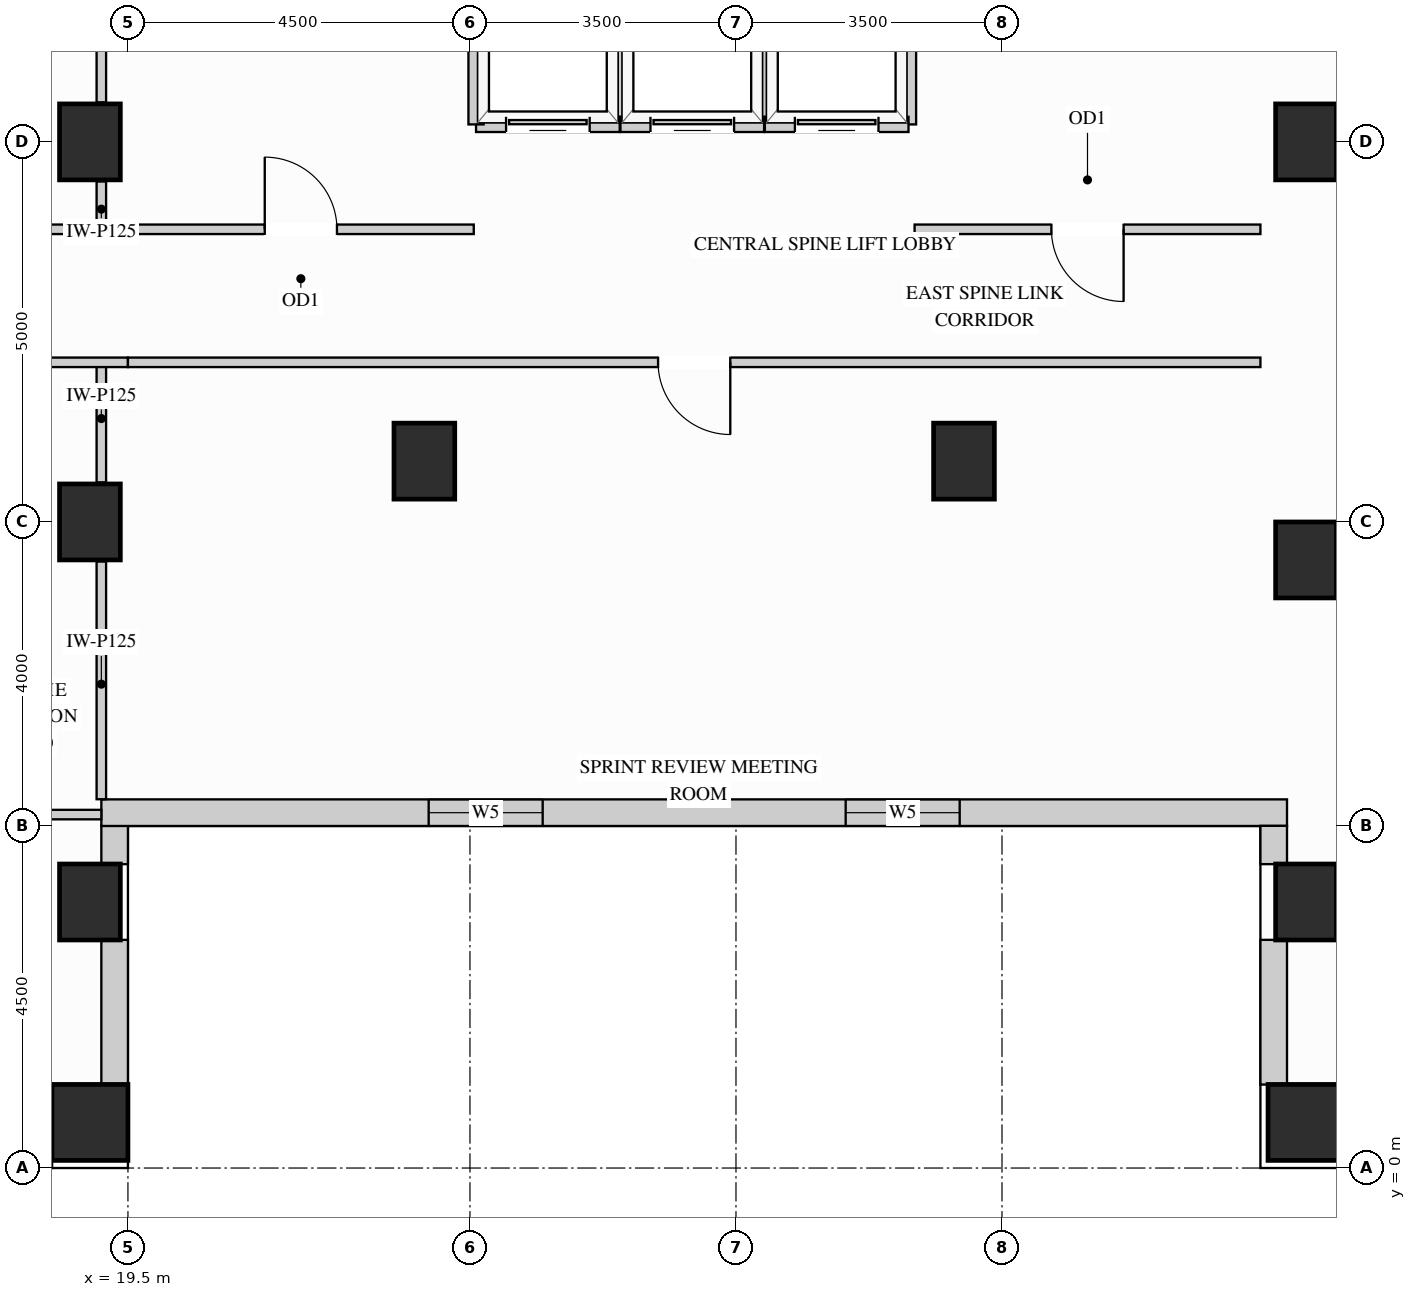
"""IFC4 building model, lengths in metres.
Left out: names, types, materials, properties, quantities, classifications, styles, units other than length and angle.
Written with IfcOpenShell. Run it as: python <this file> out.ifc"""

import sys

from ifc_helpers import new_model, si_unit, direction, frame, frame_2d, origin, origin_2d, place, context, subcontext, project, spatial, rectangle, extrude, source, transform, mapped, element, fill, save


model = new_model("IFC4")
c1 = context("Model", 3, precision=1e-05, world=origin(), true_north=direction((0.0, 1.0)))
c2 = subcontext(c1, "Body", "Model", "MODEL_VIEW")
j1 = project(units=[si_unit("LENGTHUNIT", "METRE"), si_unit("PLANEANGLEUNIT", "RADIAN")], contexts=[c1])
p1 = place(None, origin())
s1 = spatial("IfcSite", under=j1, at=p1, CompositionType="ELEMENT")
p2 = place(p1, origin())
s2 = spatial("IfcBuilding", under=s1, at=p2, CompositionType="ELEMENT")
p3 = place(p2, frame((0.0, 0.0, 143.1)))
s3 = spatial("IfcBuildingStorey", under=s2, at=p3, CompositionType="ELEMENT", Elevation=143.1)
m1 = source(origin(), c2, "Body", "SweptSolid", [
    extrude(rectangle(XDim=0.8, YDim=1.0, at=origin_2d()), origin(), (0.0, 0.0, 1.0), 3.4),
])
for number, where, z_axis, x_axis in (
    (1, (19.0, 13.5, 0.0), (0.0, 0.0, 1.0), (1.0, 0.0, 0.0)),
    (2, (19.0, 3.5, 0.0), (0.0, 0.0, 1.0), (1.0, 0.0, 0.0)),
    (3, (19.0, 8.5, 0.0), (0.0, 0.0, 1.0), (1.0, 0.0, 0.0)),
    (4, (35.0, 13.5, 0.0), (0.0, 0.0, 1.0), (1.0, 0.0, 0.0)),
    (5, (35.0, 3.5, 0.0), (0.0, 0.0, 1.0), (1.0, 0.0, 0.0)),
    (6, (35.0, 8.0, 0.0), (0.0, 0.0, 1.0), (1.0, 0.0, 0.0)),
    (7, (23.4, 9.3, 0.0), (0.0, 0.0, 1.0), (1.0, 0.0, 0.0)),
    (8, (30.5, 9.3, 0.0), (0.0, 0.0, 1.0), (1.0, 0.0, 0.0)),
):
    element("IfcColumn", number, at=place(p3, frame(where, z_axis=z_axis, x_axis=x_axis)), inside=s3, PredefinedType="COLUMN", context=c2, shape_type="MappedRepresentation", body=[
        mapped(m1, transform((0.0, 0.0, 0.0), x_axis=(1.0, 0.0, 0.0), y_axis=(0.0, 1.0, 0.0), z_axis=(0.0, 0.0, 1.0))),
    ])
m2 = source(origin(), c2, "Body", "SweptSolid", [
    extrude(rectangle(XDim=1.0, YDim=1.0, at=origin_2d()), origin(), (0.0, 0.0, 1.0), 3.4),
])
for number, where, z_axis, x_axis in (
    (9, (19.0, 0.6, 0.0), (0.0, 0.0, 1.0), (1.0, 0.0, 0.0)),
    (10, (35.0, 0.6, 0.0), (0.0, 0.0, 1.0), (1.0, 0.0, 0.0)),
):
    element("IfcColumn", number, at=place(p3, frame(where, z_axis=z_axis, x_axis=x_axis)), inside=s3, PredefinedType="COLUMN", context=c2, shape_type="MappedRepresentation", body=[
        mapped(m2, transform((0.0, 0.0, 0.0), x_axis=(1.0, 0.0, 0.0), y_axis=(0.0, 1.0, 0.0), z_axis=(0.0, 0.0, 1.0))),
    ])
p4 = place(p3, frame((14.998, 0.175, 0.0), z_axis=(0.0, 0.0, 1.0), x_axis=(1.0, 0.0, 0.0)))
e11 = element("IfcWall", 11, at=p4, inside=s3, PredefinedType="SOLIDWALL", context=c2, shape_type="SweptSolid", body=[
    extrude(rectangle(XDim=3.504, YDim=0.35, at=frame_2d((1.752, 0.0))), origin(), (0.0, 0.0, 1.0), 2.612),
])
p5 = place(p4, frame((0.552, 0.0, 0.78)))
e12 = element("IfcOpeningElement", 12, at=p5, cuts=e11, PredefinedType="OPENING", context=c2, shape_type="SweptSolid", body=[
    extrude(rectangle(XDim=2.4, YDim=1.652, at=frame_2d((1.2, 0.826))), frame((0.0, 0.185, 0.0), z_axis=(0.0, -1.0, 0.0), x_axis=(1.0, 0.0, 0.0)), (0.0, 0.0, 1.0), 0.37),
])
m3 = source(origin(), c2, "Body", "SweptSolid", [
    extrude(rectangle(XDim=1.904, YDim=0.35, at=frame_2d((0.952, 0.0))), origin(), (0.0, 0.0, 1.0), 2.612),
])
p6 = place(p3, frame((19.325, 1.098, 0.0), z_axis=(0.0, 0.0, 1.0), x_axis=(0.0, 1.0, 0.0)))
e13 = element("IfcWall", 13, at=p6, inside=s3, PredefinedType="SOLIDWALL", context=c2, shape_type="MappedRepresentation", body=[
    mapped(m3, transform((0.0, 0.0, 0.0), x_axis=(1.0, 0.0, 0.0), y_axis=(0.0, 1.0, 0.0), z_axis=(0.0, 0.0, 1.0))),
])
m4 = source(origin(), c2, "Body", "SweptSolid", [
    extrude(rectangle(XDim=0.504, YDim=0.35, at=frame_2d((0.252, 0.0))), origin(), (0.0, 0.0, 1.0), 2.773),
])
p7 = place(p3, frame((19.325, 3.998, 0.0), z_axis=(0.0, 0.0, 1.0), x_axis=(0.0, 1.0, 0.0)))
e14 = element("IfcWall", 14, at=p7, inside=s3, PredefinedType="SOLIDWALL", context=c2, shape_type="MappedRepresentation", body=[
    mapped(m4, transform((0.0, 0.0, 0.0), x_axis=(1.0, 0.0, 0.0), y_axis=(0.0, 1.0, 0.0), z_axis=(0.0, 0.0, 1.0))),
])
p8 = place(p3, frame((19.15, 4.675, 0.0), z_axis=(0.0, 0.0, 1.0), x_axis=(1.0, 0.0, 0.0)))
e15 = element("IfcWall", 15, at=p8, inside=s3, PredefinedType="SOLIDWALL", context=c2, shape_type="SweptSolid", body=[
    extrude(rectangle(XDim=15.6, YDim=0.35, at=frame_2d((7.8, 0.0))), origin(), (0.0, 0.0, 1.0), 3.385),
])
p9 = place(p8, frame((4.307, 0.0, 0.78)))
e16 = element("IfcOpeningElement", 16, at=p9, cuts=e15, PredefinedType="OPENING", context=c2, shape_type="SweptSolid", body=[
    extrude(rectangle(XDim=1.5, YDim=2.0, at=frame_2d((0.75, 1.0))), frame((0.0, 0.185, 0.0), z_axis=(0.0, -1.0, 0.0), x_axis=(1.0, 0.0, 0.0)), (0.0, 0.0, 1.0), 0.37),
])
p10 = place(p8, frame((9.793, 0.0, 0.78)))
e17 = element("IfcOpeningElement", 17, at=p10, cuts=e15, PredefinedType="OPENING", context=c2, shape_type="SweptSolid", body=[
    extrude(rectangle(XDim=1.5, YDim=2.0, at=frame_2d((0.75, 1.0))), frame((0.0, 0.185, 0.0), z_axis=(0.0, -1.0, 0.0), x_axis=(1.0, 0.0, 0.0)), (0.0, 0.0, 1.0), 0.37),
])
m5 = source(origin(), c2, "Body", "SweptSolid", [
    extrude(rectangle(XDim=0.504, YDim=0.35, at=frame_2d((0.252, 0.0))), origin(), (0.0, 0.0, 1.0), 3.385),
])
p11 = place(p3, frame((34.575, 4.502, 0.0), z_axis=(0.0, 0.0, 1.0), x_axis=(0.0, -1.0, 0.0)))
e18 = element("IfcWall", 18, at=p11, inside=s3, PredefinedType="SOLIDWALL", context=c2, shape_type="MappedRepresentation", body=[
    mapped(m5, transform((0.0, 0.0, 0.0), x_axis=(1.0, 0.0, 0.0), y_axis=(0.0, 1.0, 0.0), z_axis=(0.0, 0.0, 1.0))),
])
p12 = place(p3, frame((34.575, 3.002, 0.0), z_axis=(0.0, 0.0, 1.0), x_axis=(0.0, -1.0, 0.0)))
e19 = element("IfcWall", 19, at=p12, inside=s3, PredefinedType="SOLIDWALL", context=c2, shape_type="MappedRepresentation", body=[
    mapped(m3, transform((0.0, 0.0, 0.0), x_axis=(1.0, 0.0, 0.0), y_axis=(0.0, 1.0, 0.0), z_axis=(0.0, 0.0, 1.0))),
])
m6 = source(origin(), c2, "Body", "SweptSolid", [
    extrude(rectangle(XDim=0.63, YDim=0.125, at=frame_2d((0.315, 0.0))), origin(), (0.0, 0.0, 1.0), 2.773),
])
p13 = place(p3, frame((19.15, 12.35, 0.0), z_axis=(0.0, 0.0, 1.0), x_axis=(0.0, 1.0, 0.0)))
e20 = element("IfcWall", 20, at=p13, inside=s3, PredefinedType="PARTITIONING", context=c2, shape_type="MappedRepresentation", body=[
    mapped(m6, transform((0.0, 0.0, 0.0), x_axis=(1.0, 0.0, 0.0), y_axis=(0.0, 1.0, 0.0), z_axis=(0.0, 0.0, 1.0))),
])
m7 = source(origin(), c2, "Body", "SweptSolid", [
    extrude(rectangle(XDim=3.46, YDim=0.125, at=frame_2d((1.73, 0.0))), origin(), (0.0, 0.0, 1.0), 2.773),
])
p14 = place(p3, frame((19.15, 14.02, 0.0), z_axis=(0.0, 0.0, 1.0), x_axis=(0.0, 1.0, 0.0)))
e21 = element("IfcWall", 21, at=p14, inside=s3, PredefinedType="PARTITIONING", context=c2, shape_type="MappedRepresentation", body=[
    mapped(m7, transform((0.0, 0.0, 0.0), x_axis=(1.0, 0.0, 0.0), y_axis=(0.0, 1.0, 0.0), z_axis=(0.0, 0.0, 1.0))),
])
m8 = source(origin(), c2, "Body", "SweptSolid", [
    extrude(rectangle(XDim=3.128, YDim=0.125, at=frame_2d((1.564, 0.0))), origin(), (0.0, 0.0, 1.0), 2.773),
])
p15 = place(p3, frame((19.15, 4.852, 0.0), z_axis=(0.0, 0.0, 1.0), x_axis=(0.0, 1.0, 0.0)))
e22 = element("IfcWall", 22, at=p15, inside=s3, PredefinedType="PARTITIONING", context=c2, shape_type="MappedRepresentation", body=[
    mapped(m8, transform((0.0, 0.0, 0.0), x_axis=(1.0, 0.0, 0.0), y_axis=(0.0, 1.0, 0.0), z_axis=(0.0, 0.0, 1.0))),
])
m9 = source(origin(), c2, "Body", "SweptSolid", [
    extrude(rectangle(XDim=1.58, YDim=0.125, at=frame_2d((0.79, 0.0))), origin(), (0.0, 0.0, 1.0), 2.773),
])
p16 = place(p3, frame((19.15, 9.02, 0.0), z_axis=(0.0, 0.0, 1.0), x_axis=(0.0, 1.0, 0.0)))
e23 = element("IfcWall", 23, at=p16, inside=s3, PredefinedType="PARTITIONING", context=c2, shape_type="MappedRepresentation", body=[
    mapped(m9, transform((0.0, 0.0, 0.0), x_axis=(1.0, 0.0, 0.0), y_axis=(0.0, 1.0, 0.0), z_axis=(0.0, 0.0, 1.0))),
])
p17 = place(p3, frame((29.85, 12.35, 0.0), z_axis=(0.0, 0.0, 1.0), x_axis=(1.0, 0.0, 0.0)))
e24 = element("IfcWall", 24, at=p17, inside=s3, PredefinedType="PARTITIONING", context=c2, shape_type="SweptSolid", body=[
    extrude(rectangle(XDim=4.55, YDim=0.125, at=frame_2d((2.275, 0.0))), origin(), (0.0, 0.0, 1.0), 3.385),
])
p18 = place(p17, frame((1.8, 0.0, 0.0)))
e25 = element("IfcOpeningElement", 25, at=p18, cuts=e24, PredefinedType="OPENING", context=c2, shape_type="SweptSolid", body=[
    extrude(rectangle(XDim=0.95, YDim=2.15, at=frame_2d((0.475, 1.075))), frame((0.0, 0.073, 0.0), z_axis=(0.0, -1.0, 0.0), x_axis=(1.0, 0.0, 0.0)), (0.0, 0.0, 1.0), 0.145),
])
m10 = source(origin(), c2, "Body", "SweptSolid", [
    extrude(rectangle(XDim=2.45, YDim=0.125, at=frame_2d((1.225, 0.0))), origin(), (0.0, 0.0, 1.0), 3.385),
])
p19 = place(p3, frame((17.05, 12.35, 0.0), z_axis=(0.0, 0.0, 1.0), x_axis=(1.0, 0.0, 0.0)))
e26 = element("IfcWall", 26, at=p19, inside=s3, PredefinedType="PARTITIONING", context=c2, shape_type="MappedRepresentation", body=[
    mapped(m10, transform((0.0, 0.0, 0.0), x_axis=(1.0, 0.0, 0.0), y_axis=(0.0, 1.0, 0.0), z_axis=(0.0, 0.0, 1.0))),
])
p20 = place(p3, frame((19.5, 12.35, 0.0), z_axis=(0.0, 0.0, 1.0), x_axis=(1.0, 0.0, 0.0)))
e27 = element("IfcWall", 27, at=p20, inside=s3, PredefinedType="PARTITIONING", context=c2, shape_type="SweptSolid", body=[
    extrude(rectangle(XDim=4.55, YDim=0.125, at=frame_2d((2.275, 0.0))), origin(), (0.0, 0.0, 1.0), 3.385),
])
p21 = place(p20, frame((1.8, 0.0, 0.0)))
e28 = element("IfcOpeningElement", 28, at=p21, cuts=e27, PredefinedType="OPENING", context=c2, shape_type="SweptSolid", body=[
    extrude(rectangle(XDim=0.95, YDim=2.15, at=frame_2d((0.475, 1.075))), frame((0.0, 0.073, 0.0), z_axis=(0.0, -1.0, 0.0), x_axis=(1.0, 0.0, 0.0)), (0.0, 0.0, 1.0), 0.145),
])
p22 = place(p3, frame((17.05, 10.6, 0.0), z_axis=(0.0, 0.0, 1.0), x_axis=(1.0, 0.0, 0.0)))
e29 = element("IfcWall", 29, at=p22, inside=s3, PredefinedType="PARTITIONING", context=c2, shape_type="MappedRepresentation", body=[
    mapped(m10, transform((0.0, 0.0, 0.0), x_axis=(1.0, 0.0, 0.0), y_axis=(0.0, 1.0, 0.0), z_axis=(0.0, 0.0, 1.0))),
])
p23 = place(p3, frame((19.5, 10.6, 0.0), z_axis=(0.0, 0.0, 1.0), x_axis=(1.0, 0.0, 0.0)))
e30 = element("IfcWall", 30, at=p23, inside=s3, PredefinedType="PARTITIONING", context=c2, shape_type="SweptSolid", body=[
    extrude(rectangle(XDim=14.9, YDim=0.125, at=frame_2d((7.45, 0.0))), origin(), (0.0, 0.0, 1.0), 3.385),
])
p24 = place(p23, frame((6.975, 0.0, 0.0)))
e31 = element("IfcOpeningElement", 31, at=p24, cuts=e30, PredefinedType="OPENING", context=c2, shape_type="SweptSolid", body=[
    extrude(rectangle(XDim=0.95, YDim=2.15, at=frame_2d((0.475, 1.075))), frame((0.0, 0.073, 0.0), z_axis=(0.0, -1.0, 0.0), x_axis=(1.0, 0.0, 0.0)), (0.0, 0.0, 1.0), 0.145),
])
m11 = source(origin(), c2, "Body", "SweptSolid", [
    extrude(rectangle(XDim=2.1, YDim=0.125, at=frame_2d((1.05, 0.0))), origin(), (0.0, 0.0, 1.0), 2.848),
])
p25 = place(p3, frame((17.05, 4.65, 0.0), z_axis=(0.0, 0.0, 1.0), x_axis=(1.0, 0.0, 0.0)))
e32 = element("IfcWall", 32, at=p25, inside=s3, PredefinedType="PARTITIONING", context=c2, shape_type="MappedRepresentation", body=[
    mapped(m11, transform((0.0, 0.0, 0.0), x_axis=(1.0, 0.0, 0.0), y_axis=(0.0, 1.0, 0.0), z_axis=(0.0, 0.0, 1.0))),
])
m12 = source(origin(), c2, "Body", "SweptSolid", [
    extrude(rectangle(XDim=2.29, YDim=0.2, at=frame_2d((1.145, 0.0))), origin(), (0.0, 0.0, 1.0), 3.385),
])
p26 = place(p3, frame((25.97, 13.73, 0.0), z_axis=(0.0, 0.0, 1.0), x_axis=(0.0, 1.0, 0.0)))
e33 = element("IfcWall", 33, at=p26, inside=s3, PredefinedType="PARTITIONING", context=c2, shape_type="MappedRepresentation", body=[
    mapped(m12, transform((0.0, 0.0, 0.0), x_axis=(1.0, 0.0, 0.0), y_axis=(0.0, 1.0, 0.0), z_axis=(0.0, 0.0, 1.0))),
])
p27 = place(p3, frame((24.08, 13.73, 0.0), z_axis=(0.0, 0.0, 1.0), x_axis=(1.0, 0.0, 0.0)))
e34 = element("IfcWall", 34, at=p27, inside=s3, PredefinedType="PARTITIONING", context=c2, shape_type="SweptSolid", body=[
    extrude(rectangle(XDim=1.89, YDim=0.2, at=frame_2d((0.945, 0.0))), origin(), (0.0, 0.0, 1.0), 2.466),
])
p28 = place(p27, frame((0.395, 0.0, 0.0)))
e35 = element("IfcOpeningElement", 35, at=p28, cuts=e34, PredefinedType="OPENING", context=c2, shape_type="SweptSolid", body=[
    extrude(rectangle(XDim=1.1, YDim=2.2, at=frame_2d((0.55, 1.1))), frame((0.0, 0.11, 0.0), z_axis=(0.0, -1.0, 0.0), x_axis=(1.0, 0.0, 0.0)), (0.0, 0.0, 1.0), 0.22),
])
for number, where, z_axis, x_axis in (
    (36, (24.08, 13.73, 0.0), (0.0, 0.0, 1.0), (0.0, 1.0, 0.0)),
    (37, (27.87, 13.73, 0.0), (0.0, 0.0, 1.0), (0.0, 1.0, 0.0)),
):
    element("IfcWall", number, at=place(p3, frame(where, z_axis=z_axis, x_axis=x_axis)), inside=s3, PredefinedType="PARTITIONING", context=c2, shape_type="MappedRepresentation", body=[
        mapped(m12, transform((0.0, 0.0, 0.0), x_axis=(1.0, 0.0, 0.0), y_axis=(0.0, 1.0, 0.0), z_axis=(0.0, 0.0, 1.0))),
    ])
p29 = place(p3, frame((25.98, 13.73, 0.0), z_axis=(0.0, 0.0, 1.0), x_axis=(1.0, 0.0, 0.0)))
e38 = element("IfcWall", 38, at=p29, inside=s3, PredefinedType="PARTITIONING", context=c2, shape_type="SweptSolid", body=[
    extrude(rectangle(XDim=1.89, YDim=0.2, at=frame_2d((0.945, 0.0))), origin(), (0.0, 0.0, 1.0), 2.466),
])
p30 = place(p29, frame((0.395, 0.0, 0.0)))
e39 = element("IfcOpeningElement", 39, at=p30, cuts=e38, PredefinedType="OPENING", context=c2, shape_type="SweptSolid", body=[
    extrude(rectangle(XDim=1.1, YDim=2.2, at=frame_2d((0.55, 1.1))), frame((0.0, 0.11, 0.0), z_axis=(0.0, -1.0, 0.0), x_axis=(1.0, 0.0, 0.0)), (0.0, 0.0, 1.0), 0.22),
])
p31 = place(p3, frame((29.77, 13.73, 0.0), z_axis=(0.0, 0.0, 1.0), x_axis=(0.0, 1.0, 0.0)))
e40 = element("IfcWall", 40, at=p31, inside=s3, PredefinedType="PARTITIONING", context=c2, shape_type="MappedRepresentation", body=[
    mapped(m12, transform((0.0, 0.0, 0.0), x_axis=(1.0, 0.0, 0.0), y_axis=(0.0, 1.0, 0.0), z_axis=(0.0, 0.0, 1.0))),
])
p32 = place(p3, frame((27.88, 13.73, 0.0), z_axis=(0.0, 0.0, 1.0), x_axis=(1.0, 0.0, 0.0)))
e41 = element("IfcWall", 41, at=p32, inside=s3, PredefinedType="PARTITIONING", context=c2, shape_type="SweptSolid", body=[
    extrude(rectangle(XDim=1.89, YDim=0.2, at=frame_2d((0.945, 0.0))), origin(), (0.0, 0.0, 1.0), 2.466),
])
p33 = place(p32, frame((0.395, 0.0, 0.0)))
e42 = element("IfcOpeningElement", 42, at=p33, cuts=e41, PredefinedType="OPENING", context=c2, shape_type="SweptSolid", body=[
    extrude(rectangle(XDim=1.1, YDim=2.2, at=frame_2d((0.55, 1.1))), frame((0.0, 0.11, 0.0), z_axis=(0.0, -1.0, 0.0), x_axis=(1.0, 0.0, 0.0)), (0.0, 0.0, 1.0), 0.22),
])
m13 = source(origin(), c2, "Body", "SweptSolid", [
    extrude(rectangle(XDim=1.1, YDim=2.2, at=frame_2d((0.55, 1.1))), frame((0.0, 0.025, 0.0), z_axis=(0.0, -1.0, 0.0), x_axis=(1.0, 0.0, 0.0)), (0.0, 0.0, 1.0), 0.05),
])
p34 = place(p28, origin())
e43 = element("IfcDoor", 43, at=p34, inside=s3, OperationType="SLIDING_TO_LEFT", PredefinedType="DOOR", context=c2, shape_type="MappedRepresentation", body=[
    mapped(m13, transform((0.0, 0.0, 0.0), x_axis=(1.0, 0.0, 0.0), y_axis=(0.0, 1.0, 0.0), z_axis=(0.0, 0.0, 1.0))),
])
fill(e35, e43)
p35 = place(p30, origin())
e44 = element("IfcDoor", 44, at=p35, inside=s3, OperationType="SLIDING_TO_LEFT", PredefinedType="DOOR", context=c2, shape_type="MappedRepresentation", body=[
    mapped(m13, transform((0.0, 0.0, 0.0), x_axis=(1.0, 0.0, 0.0), y_axis=(0.0, 1.0, 0.0), z_axis=(0.0, 0.0, 1.0))),
])
fill(e39, e44)
p36 = place(p33, origin())
e45 = element("IfcDoor", 45, at=p36, inside=s3, OperationType="SLIDING_TO_LEFT", PredefinedType="DOOR", context=c2, shape_type="MappedRepresentation", body=[
    mapped(m13, transform((0.0, 0.0, 0.0), x_axis=(1.0, 0.0, 0.0), y_axis=(0.0, 1.0, 0.0), z_axis=(0.0, 0.0, 1.0))),
])
fill(e42, e45)
m14 = source(origin(), c2, "Body", "SweptSolid", [
    extrude(rectangle(XDim=0.95, YDim=2.15, at=frame_2d((0.475, 1.075))), frame((0.0, 0.025, 0.0), z_axis=(0.0, -1.0, 0.0), x_axis=(1.0, 0.0, 0.0)), (0.0, 0.0, 1.0), 0.05),
])
p37 = place(p21, origin())
e46 = element("IfcDoor", 46, at=p37, inside=s3, OperationType="SINGLE_SWING_LEFT", PredefinedType="DOOR", context=c2, shape_type="MappedRepresentation", body=[
    mapped(m14, transform((0.0, 0.0, 0.0), x_axis=(1.0, 0.0, 0.0), y_axis=(0.0, 1.0, 0.0), z_axis=(0.0, 0.0, 1.0))),
])
fill(e28, e46)
p38 = place(p18, origin())
e47 = element("IfcDoor", 47, at=p38, inside=s3, OperationType="SINGLE_SWING_RIGHT", PredefinedType="DOOR", context=c2, shape_type="MappedRepresentation", body=[
    mapped(m14, transform((0.0, 0.0, 0.0), x_axis=(1.0, 0.0, 0.0), y_axis=(0.0, 1.0, 0.0), z_axis=(0.0, 0.0, 1.0))),
])
fill(e25, e47)
p39 = place(p24, origin())
e48 = element("IfcDoor", 48, at=p39, inside=s3, OperationType="SINGLE_SWING_RIGHT", PredefinedType="DOOR", context=c2, shape_type="MappedRepresentation", body=[
    mapped(m14, transform((0.0, 0.0, 0.0), x_axis=(1.0, 0.0, 0.0), y_axis=(0.0, 1.0, 0.0), z_axis=(0.0, 0.0, 1.0))),
])
fill(e31, e48)
m15 = source(origin(), c2, "Body", "SweptSolid", [
    extrude(rectangle(XDim=1.5, YDim=2.0, at=frame_2d((0.75, 1.0))), frame((0.0, 0.03, 0.0), z_axis=(0.0, -1.0, 0.0), x_axis=(1.0, 0.0, 0.0)), (0.0, 0.0, 1.0), 0.06),
])
p40 = place(p9, origin())
e49 = element("IfcWindow", 49, at=p40, inside=s3, PartitioningType="SINGLE_PANEL", PredefinedType="WINDOW", context=c2, shape_type="MappedRepresentation", body=[
    mapped(m15, transform((0.0, 0.0, 0.0), x_axis=(1.0, 0.0, 0.0), y_axis=(0.0, 1.0, 0.0), z_axis=(0.0, 0.0, 1.0))),
])
fill(e16, e49)
p41 = place(p10, origin())
e50 = element("IfcWindow", 50, at=p41, inside=s3, PartitioningType="SINGLE_PANEL", PredefinedType="WINDOW", context=c2, shape_type="MappedRepresentation", body=[
    mapped(m15, transform((0.0, 0.0, 0.0), x_axis=(1.0, 0.0, 0.0), y_axis=(0.0, 1.0, 0.0), z_axis=(0.0, 0.0, 1.0))),
])
fill(e17, e50)
save(model, sys.argv[1])
